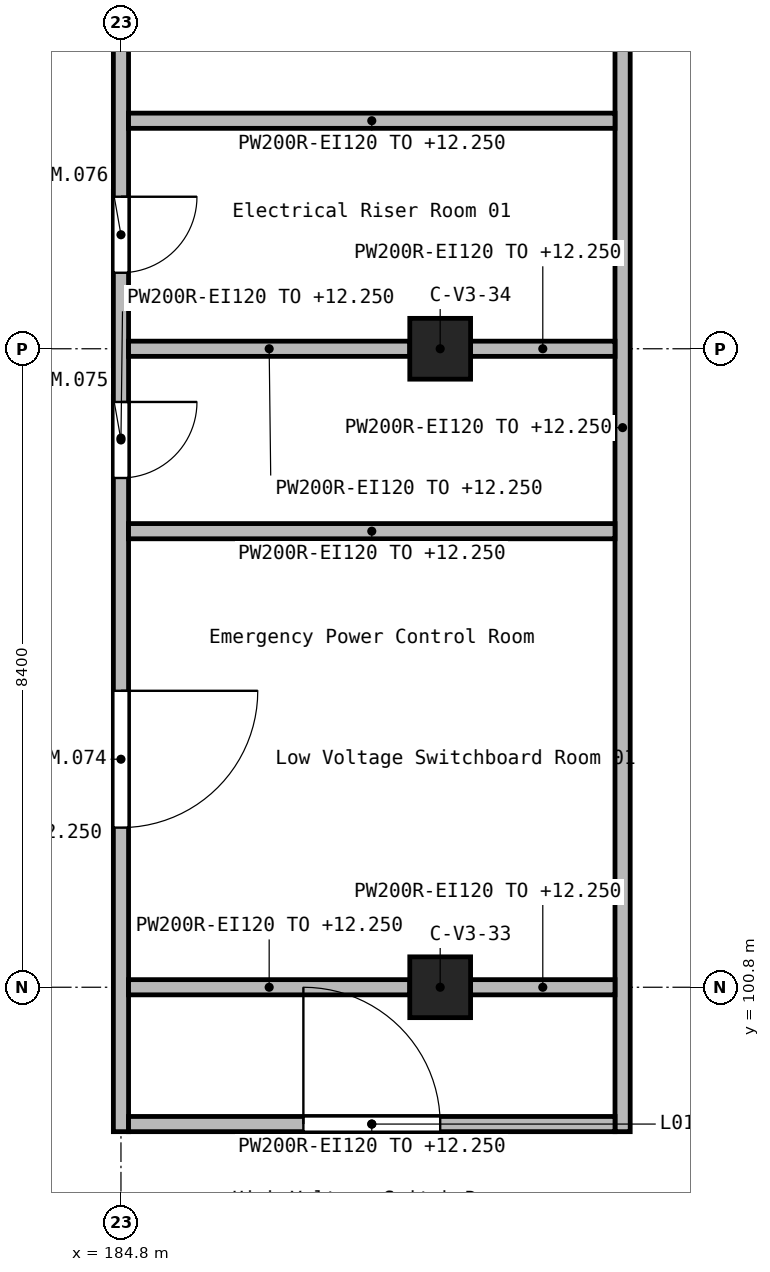
"""IFC4 building model, lengths in metres.
Left out: names, types, materials, properties, quantities, classifications, styles, units other than length and angle.
Written with IfcOpenShell. Run it as: python <this file> out.ifc"""

import sys

from ifc_helpers import new_model, si_unit, direction, frame, frame_2d, origin, origin_2d, place, context, subcontext, project, spatial, rectangle, extrude, element, fill, save


model = new_model("IFC4")
c1 = context("Model", 3, precision=1e-05, world=origin(), true_north=direction((0.0, 1.0)))
c2 = subcontext(c1, "Body", "Model", "MODEL_VIEW")
j1 = project(units=[si_unit("LENGTHUNIT", "METRE"), si_unit("PLANEANGLEUNIT", "RADIAN")], contexts=[c1])
p1 = place(None, origin())
s1 = spatial("IfcSite", under=j1, at=p1, CompositionType="ELEMENT")
p2 = place(p1, origin())
s2 = spatial("IfcBuilding", under=s1, at=p2, CompositionType="ELEMENT")
p3 = place(p2, frame((0.0, 0.0, 9.9)))
s3 = spatial("IfcBuildingStorey", under=s2, at=p3, CompositionType="ELEMENT", Elevation=9.9)
for number, where, z_axis, x_axis in (
    (1, (189.0, 100.8, 0.0), (0.0, 0.0, 1.0), (1.0, 0.0, 0.0)),
    (2, (189.0, 109.2, 0.0), (0.0, 0.0, 1.0), (1.0, 0.0, 0.0)),
):
    element("IfcColumn", number, at=place(p3, frame(where, z_axis=z_axis, x_axis=x_axis)), inside=s3, PredefinedType="COLUMN", context=c2, shape_type="SweptSolid", body=[
        extrude(rectangle(XDim=0.8, YDim=0.8, at=origin_2d()), origin(), (0.0, 0.0, 1.0), 2.7),
    ])
p4 = place(p3, frame((184.8, 117.15, 0.0), z_axis=(0.0, 0.0, 1.0), x_axis=(0.0, -1.0, 0.0)))
e3 = element("IfcWall", 3, at=p4, inside=s3, PredefinedType="SOLIDWALL", context=c2, shape_type="SweptSolid", body=[
    extrude(rectangle(XDim=18.25, YDim=0.2, at=frame_2d((9.125, 0.0))), origin(), (0.0, 0.0, 1.0), 2.35),
])
p5 = place(p4, frame((12.45, 0.0, 0.0)))
e4 = element("IfcOpeningElement", 4, at=p5, cuts=e3, PredefinedType="OPENING", context=c2, shape_type="SweptSolid", body=[
    extrude(rectangle(XDim=1.8, YDim=2.1, at=frame_2d((0.9, 1.05))), frame((0.0, 0.11, 0.0), z_axis=(0.0, -1.0, 0.0), x_axis=(1.0, 0.0, 0.0)), (0.0, 0.0, 1.0), 0.22),
])
p6 = place(p4, frame((8.65, 0.0, 0.0)))
e5 = element("IfcOpeningElement", 5, at=p6, cuts=e3, PredefinedType="OPENING", context=c2, shape_type="SweptSolid", body=[
    extrude(rectangle(XDim=1.0, YDim=2.1, at=frame_2d((0.5, 1.05))), frame((0.0, 0.11, 0.0), z_axis=(0.0, -1.0, 0.0), x_axis=(1.0, 0.0, 0.0)), (0.0, 0.0, 1.0), 0.22),
])
p7 = place(p4, frame((5.95, 0.0, 0.0)))
e6 = element("IfcOpeningElement", 6, at=p7, cuts=e3, PredefinedType="OPENING", context=c2, shape_type="SweptSolid", body=[
    extrude(rectangle(XDim=1.0, YDim=2.1, at=frame_2d((0.5, 1.05))), frame((0.0, 0.11, 0.0), z_axis=(0.0, -1.0, 0.0), x_axis=(1.0, 0.0, 0.0)), (0.0, 0.0, 1.0), 0.22),
])
p8 = place(p4, frame((1.35, 0.0, 0.0)))
e7 = element("IfcOpeningElement", 7, at=p8, cuts=e3, PredefinedType="OPENING", context=c2, shape_type="SweptSolid", body=[
    extrude(rectangle(XDim=1.8, YDim=2.1, at=frame_2d((0.9, 1.05))), frame((0.0, 0.11, 0.0), z_axis=(0.0, -1.0, 0.0), x_axis=(1.0, 0.0, 0.0)), (0.0, 0.0, 1.0), 0.22),
])
p9 = place(p3, frame((191.4, 117.425, 0.0), z_axis=(0.0, 0.0, 1.0), x_axis=(0.0, -1.0, 0.0)))
e8 = element("IfcWall", 8, at=p9, inside=s3, PredefinedType="SOLIDWALL", context=c2, shape_type="SweptSolid", body=[
    extrude(rectangle(XDim=18.525, YDim=0.2, at=frame_2d((9.263, 0.0))), origin(), (0.0, 0.0, 1.0), 2.35),
])
p10 = place(p3, frame((184.9, 99.0, 0.0), z_axis=(0.0, 0.0, 1.0), x_axis=(1.0, 0.0, 0.0)))
e9 = element("IfcWall", 9, at=p10, inside=s3, PredefinedType="SOLIDWALL", context=c2, shape_type="SweptSolid", body=[
    extrude(rectangle(XDim=6.4, YDim=0.2, at=frame_2d((3.2, 0.0))), origin(), (0.0, 0.0, 1.0), 2.35),
])
p11 = place(p10, frame((2.3, 0.0, 0.0)))
e10 = element("IfcOpeningElement", 10, at=p11, cuts=e9, PredefinedType="OPENING", context=c2, shape_type="SweptSolid", body=[
    extrude(rectangle(XDim=1.8, YDim=2.1, at=frame_2d((0.9, 1.05))), frame((0.0, 0.11, 0.0), z_axis=(0.0, -1.0, 0.0), x_axis=(1.0, 0.0, 0.0)), (0.0, 0.0, 1.0), 0.22),
])
p12 = place(p3, frame((184.9, 100.8, 0.0), z_axis=(0.0, 0.0, 1.0), x_axis=(1.0, 0.0, 0.0)))
e11 = element("IfcWall", 11, at=p12, inside=s3, PredefinedType="SOLIDWALL", context=c2, shape_type="SweptSolid", body=[
    extrude(rectangle(XDim=3.7, YDim=0.2, at=frame_2d((1.85, 0.0))), origin(), (0.0, 0.0, 1.0), 2.35),
])
p13 = place(p3, frame((189.4, 100.8, 0.0), z_axis=(0.0, 0.0, 1.0), x_axis=(1.0, 0.0, 0.0)))
e12 = element("IfcWall", 12, at=p13, inside=s3, PredefinedType="SOLIDWALL", context=c2, shape_type="SweptSolid", body=[
    extrude(rectangle(XDim=1.9, YDim=0.2, at=frame_2d((0.95, 0.0))), origin(), (0.0, 0.0, 1.0), 2.35),
])
p14 = place(p3, frame((184.9, 106.8, 0.0), z_axis=(0.0, 0.0, 1.0), x_axis=(1.0, 0.0, 0.0)))
e13 = element("IfcWall", 13, at=p14, inside=s3, PredefinedType="SOLIDWALL", context=c2, shape_type="SweptSolid", body=[
    extrude(rectangle(XDim=6.4, YDim=0.2, at=frame_2d((3.2, 0.0))), origin(), (0.0, 0.0, 1.0), 2.35),
])
p15 = place(p3, frame((184.9, 109.2, 0.0), z_axis=(0.0, 0.0, 1.0), x_axis=(1.0, 0.0, 0.0)))
e14 = element("IfcWall", 14, at=p15, inside=s3, PredefinedType="SOLIDWALL", context=c2, shape_type="SweptSolid", body=[
    extrude(rectangle(XDim=3.7, YDim=0.2, at=frame_2d((1.85, 0.0))), origin(), (0.0, 0.0, 1.0), 2.35),
])
p16 = place(p3, frame((189.4, 109.2, 0.0), z_axis=(0.0, 0.0, 1.0), x_axis=(1.0, 0.0, 0.0)))
e15 = element("IfcWall", 15, at=p16, inside=s3, PredefinedType="SOLIDWALL", context=c2, shape_type="SweptSolid", body=[
    extrude(rectangle(XDim=1.9, YDim=0.2, at=frame_2d((0.95, 0.0))), origin(), (0.0, 0.0, 1.0), 2.35),
])
p17 = place(p3, frame((184.9, 112.2, 0.0), z_axis=(0.0, 0.0, 1.0), x_axis=(1.0, 0.0, 0.0)))
e16 = element("IfcWall", 16, at=p17, inside=s3, PredefinedType="SOLIDWALL", context=c2, shape_type="SweptSolid", body=[
    extrude(rectangle(XDim=6.4, YDim=0.2, at=frame_2d((3.2, 0.0))), origin(), (0.0, 0.0, 1.0), 2.35),
])
p18 = place(p11, origin())
e17 = element("IfcDoor", 17, at=p18, inside=s3, OperationType="DOUBLE_DOOR_SINGLE_SWING", PredefinedType="DOOR", context=c2, shape_type="SweptSolid", body=[
    extrude(rectangle(XDim=1.8, YDim=2.1, at=frame_2d((0.9, 1.05))), frame((0.0, 0.025, 0.0), z_axis=(0.0, -1.0, 0.0), x_axis=(1.0, 0.0, 0.0)), (0.0, 0.0, 1.0), 0.05),
])
fill(e10, e17)
p19 = place(p5, origin())
e18 = element("IfcDoor", 18, at=p19, inside=s3, OperationType="DOUBLE_DOOR_SINGLE_SWING", PredefinedType="DOOR", context=c2, shape_type="SweptSolid", body=[
    extrude(rectangle(XDim=1.8, YDim=2.1, at=frame_2d((0.9, 1.05))), frame((0.0, 0.025, 0.0), z_axis=(0.0, -1.0, 0.0), x_axis=(1.0, 0.0, 0.0)), (0.0, 0.0, 1.0), 0.05),
])
fill(e4, e18)
p20 = place(p6, origin())
e19 = element("IfcDoor", 19, at=p20, inside=s3, OperationType="SINGLE_SWING_RIGHT", PredefinedType="DOOR", context=c2, shape_type="SweptSolid", body=[
    extrude(rectangle(XDim=1.0, YDim=2.1, at=frame_2d((0.5, 1.05))), frame((0.0, 0.025, 0.0), z_axis=(0.0, -1.0, 0.0), x_axis=(1.0, 0.0, 0.0)), (0.0, 0.0, 1.0), 0.05),
])
fill(e5, e19)
p21 = place(p7, origin())
e20 = element("IfcDoor", 20, at=p21, inside=s3, OperationType="SINGLE_SWING_LEFT", PredefinedType="DOOR", context=c2, shape_type="SweptSolid", body=[
    extrude(rectangle(XDim=1.0, YDim=2.1, at=frame_2d((0.5, 1.05))), frame((0.0, 0.025, 0.0), z_axis=(0.0, -1.0, 0.0), x_axis=(1.0, 0.0, 0.0)), (0.0, 0.0, 1.0), 0.05),
])
fill(e6, e20)
save(model, sys.argv[1])
